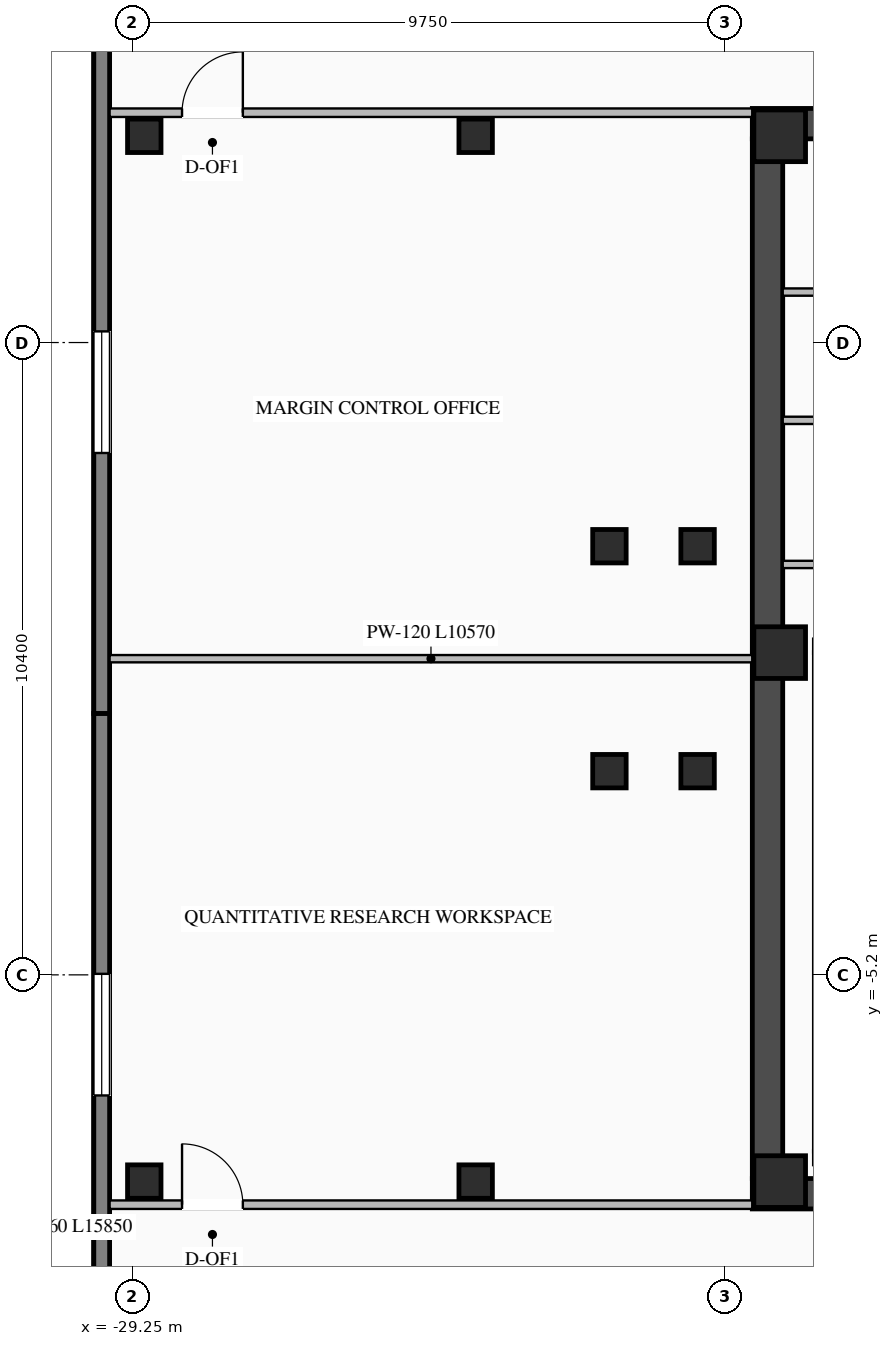
"""IFC4 building model, lengths in metres.
Left out: names, types, materials, properties, quantities, classifications, styles, units other than length and angle.
Written with IfcOpenShell. Run it as: python <this file> out.ifc"""

import sys

from ifc_helpers import new_model, si_unit, direction, frame, frame_2d, origin, origin_2d, place, context, subcontext, project, spatial, rectangle, i_section, extrude, element, fill, save


model = new_model("IFC4")
c1 = context("Model", 3, precision=1e-05, world=origin(), true_north=direction((0.0, 1.0)))
c2 = subcontext(c1, "Body", "Model", "MODEL_VIEW")
j1 = project(units=[si_unit("LENGTHUNIT", "METRE"), si_unit("PLANEANGLEUNIT", "RADIAN")], contexts=[c1])
p1 = place(None, origin())
s1 = spatial("IfcSite", under=j1, at=p1, CompositionType="ELEMENT")
p2 = place(p1, origin())
s2 = spatial("IfcBuilding", under=s1, at=p2, CompositionType="ELEMENT")
p3 = place(p2, frame((0.0, 0.0, 204.3)))
s3 = spatial("IfcBuildingStorey", under=s2, at=p3, CompositionType="ELEMENT", Elevation=204.3)
p4 = place(p3, frame((-19.05, -8.8, 0.0), z_axis=(0.0, 0.0, 1.0), x_axis=(1.0, 0.0, 0.0)))
e1 = element("IfcWall", 1, at=p4, inside=s3, PredefinedType="SHEAR", context=c2, shape_type="SweptSolid", body=[
    extrude(rectangle(XDim=10.25, YDim=0.5, at=frame_2d((5.125, 0.0))), origin(), (0.0, 0.0, 1.0), 4.02),
])
p5 = place(p3, frame((-19.05, 8.8, 0.0), z_axis=(0.0, 0.0, 1.0), x_axis=(1.0, 0.0, 0.0)))
e2 = element("IfcWall", 2, at=p5, inside=s3, PredefinedType="SHEAR", context=c2, shape_type="SweptSolid", body=[
    extrude(rectangle(XDim=10.25, YDim=0.5, at=frame_2d((5.125, 0.0))), origin(), (0.0, 0.0, 1.0), 4.02),
])
p6 = place(p5, frame((5.6, 0.0, 0.0)))
e3 = element("IfcOpeningElement", 3, at=p6, cuts=e2, PredefinedType="OPENING", context=c2, shape_type="SweptSolid", body=[
    extrude(rectangle(XDim=1.4, YDim=2.05, at=frame_2d((0.7, 1.025))), frame((0.0, 0.26, 0.0), z_axis=(0.0, -1.0, 0.0), x_axis=(1.0, 0.0, 0.0)), (0.0, 0.0, 1.0), 0.52),
])
p7 = place(p3, frame((-18.8, -8.55, 0.0), z_axis=(0.0, 0.0, 1.0), x_axis=(0.0, 1.0, 0.0)))
e4 = element("IfcWall", 4, at=p7, inside=s3, PredefinedType="SHEAR", context=c2, shape_type="SweptSolid", body=[
    extrude(rectangle(XDim=17.1, YDim=0.5, at=frame_2d((8.55, 0.0))), origin(), (0.0, 0.0, 1.0), 4.02),
])
for number, where, z_axis, x_axis in (
    (5, (-18.6, -8.6, 0.0), (0.0, 0.0, 1.0), (1.0, 0.0, 0.0)),
    (6, (-18.6, 0.1, 0.0), (0.0, 0.0, 1.0), (1.0, 0.0, 0.0)),
    (7, (-18.6, 8.6, 0.0), (0.0, 0.0, 1.0), (1.0, 0.0, 0.0)),
):
    element("IfcColumn", number, at=place(p3, frame(where, z_axis=z_axis, x_axis=x_axis)), inside=s3, PredefinedType="COLUMN", context=c2, shape_type="SweptSolid", body=[
        extrude(rectangle(XDim=0.85, YDim=0.85, at=origin_2d()), origin(), (0.0, 0.0, 1.0), 4.2),
    ])
for number, where, z_axis, x_axis in (
    (8, (-21.4, -1.85, 0.0), (0.0, 0.0, 1.0), (1.0, 0.0, 0.0)),
    (9, (-21.4, 1.85, 0.0), (0.0, 0.0, 1.0), (1.0, 0.0, 0.0)),
    (10, (-19.95, -1.85, 0.0), (0.0, 0.0, 1.0), (1.0, 0.0, 0.0)),
    (11, (-19.95, 1.85, 0.0), (0.0, 0.0, 1.0), (1.0, 0.0, 0.0)),
    (12, (-23.6, -8.6, 0.0), (0.0, 0.0, 1.0), (1.0, 0.0, 0.0)),
    (13, (-23.6, 8.6, 0.0), (0.0, 0.0, 1.0), (1.0, 0.0, 0.0)),
):
    element("IfcColumn", number, at=place(p3, frame(where, z_axis=z_axis, x_axis=x_axis)), inside=s3, PredefinedType="COLUMN", context=c2, shape_type="SweptSolid", body=[
        extrude(i_section(OverallWidth=0.55, OverallDepth=0.55, WebThickness=0.024, FlangeThickness=0.036, at=origin_2d()), origin(), (0.0, 0.0, 1.0), 4.2),
    ])
for number, where, z_axis, x_axis in (
    (14, (-29.05, -8.6, -0.28), (0.0, 0.0, 1.0), (1.0, 0.0, 0.0)),
    (15, (-29.05, 8.6, -0.28), (0.0, 0.0, 1.0), (1.0, 0.0, 0.0)),
):
    element("IfcColumn", number, at=place(p3, frame(where, z_axis=z_axis, x_axis=x_axis)), inside=s3, PredefinedType="COLUMN", context=c2, shape_type="SweptSolid", body=[
        extrude(i_section(OverallWidth=0.55, OverallDepth=0.55, WebThickness=0.024, FlangeThickness=0.036, at=origin_2d()), origin(), (0.0, 0.0, 1.0), 4.48),
    ])
p8 = place(p3, frame((-29.75, -16.75, 0.0), z_axis=(0.0, 0.0, 1.0), x_axis=(0.0, 1.0, 0.0)))
e16 = element("IfcWall", 16, at=p8, inside=s3, PredefinedType="STANDARD", context=c2, shape_type="SweptSolid", body=[
    extrude(rectangle(XDim=15.85, YDim=0.26, at=frame_2d((7.925, 0.0))), origin(), (0.0, 0.0, 1.0), 4.0),
])
p9 = place(p8, frame((3.233, 0.0, 0.76)))
e17 = element("IfcOpeningElement", 17, at=p9, cuts=e16, PredefinedType="OPENING", context=c2, shape_type="SweptSolid", body=[
    extrude(rectangle(XDim=2.0, YDim=2.05, at=frame_2d((1.0, 1.025))), frame((0.0, 0.14, 0.0), z_axis=(0.0, -1.0, 0.0), x_axis=(1.0, 0.0, 0.0)), (0.0, 0.0, 1.0), 0.28),
])
p10 = place(p8, frame((9.567, 0.0, 0.76)))
e18 = element("IfcOpeningElement", 18, at=p10, cuts=e16, PredefinedType="OPENING", context=c2, shape_type="SweptSolid", body=[
    extrude(rectangle(XDim=2.0, YDim=2.05, at=frame_2d((1.0, 1.025))), frame((0.0, 0.14, 0.0), z_axis=(0.0, -1.0, 0.0), x_axis=(1.0, 0.0, 0.0)), (0.0, 0.0, 1.0), 0.28),
])
p11 = place(p3, frame((-29.75, -0.9, 0.0), z_axis=(0.0, 0.0, 1.0), x_axis=(0.0, 1.0, 0.0)))
e19 = element("IfcWall", 19, at=p11, inside=s3, PredefinedType="STANDARD", context=c2, shape_type="SweptSolid", body=[
    extrude(rectangle(XDim=15.85, YDim=0.26, at=frame_2d((7.925, 0.0))), origin(), (0.0, 0.0, 1.0), 4.0),
])
p12 = place(p11, frame((4.283, 0.0, 0.76)))
e20 = element("IfcOpeningElement", 20, at=p12, cuts=e19, PredefinedType="OPENING", context=c2, shape_type="SweptSolid", body=[
    extrude(rectangle(XDim=2.0, YDim=2.05, at=frame_2d((1.0, 1.025))), frame((0.0, 0.14, 0.0), z_axis=(0.0, -1.0, 0.0), x_axis=(1.0, 0.0, 0.0)), (0.0, 0.0, 1.0), 0.28),
])
p13 = place(p3, frame((-18.55, 3.92, 0.0), z_axis=(0.0, 0.0, 1.0), x_axis=(1.0, 0.0, 0.0)))
e21 = element("IfcWall", 21, at=p13, inside=s3, PredefinedType="STANDARD", context=c2, shape_type="SweptSolid", body=[
    extrude(rectangle(XDim=4.65, YDim=0.12, at=frame_2d((2.325, 0.0))), origin(), (0.0, 0.0, 1.0), 4.0),
])
p14 = place(p3, frame((-18.55, 6.03, 0.0), z_axis=(0.0, 0.0, 1.0), x_axis=(1.0, 0.0, 0.0)))
e22 = element("IfcWall", 22, at=p14, inside=s3, PredefinedType="STANDARD", context=c2, shape_type="SweptSolid", body=[
    extrude(rectangle(XDim=2.4, YDim=0.12, at=frame_2d((1.2, 0.0))), origin(), (0.0, 0.0, 1.0), 4.0),
])
p15 = place(p3, frame((-18.55, 1.55, 0.0), z_axis=(0.0, 0.0, 1.0), x_axis=(1.0, 0.0, 0.0)))
e23 = element("IfcWall", 23, at=p15, inside=s3, PredefinedType="STANDARD", context=c2, shape_type="SweptSolid", body=[
    extrude(rectangle(XDim=4.65, YDim=0.12, at=frame_2d((2.325, 0.0))), origin(), (0.0, 0.0, 1.0), 4.0),
])
p16 = place(p3, frame((-29.62, 8.98, 0.0), z_axis=(0.0, 0.0, 1.0), x_axis=(1.0, 0.0, 0.0)))
e24 = element("IfcWall", 24, at=p16, inside=s3, PredefinedType="STANDARD", context=c2, shape_type="SweptSolid", body=[
    extrude(rectangle(XDim=10.57, YDim=0.14, at=frame_2d((5.285, 0.0))), origin(), (0.0, 0.0, 1.0), 4.0),
])
p17 = place(p16, frame((1.191, 0.0, 0.0)))
e25 = element("IfcOpeningElement", 25, at=p17, cuts=e24, PredefinedType="OPENING", context=c2, shape_type="SweptSolid", body=[
    extrude(rectangle(XDim=1.0, YDim=2.08, at=frame_2d((0.5, 1.04))), frame((0.0, 0.08, 0.0), z_axis=(0.0, -1.0, 0.0), x_axis=(1.0, 0.0, 0.0)), (0.0, 0.0, 1.0), 0.16),
])
p18 = place(p3, frame((-29.62, -8.98, 0.0), z_axis=(0.0, 0.0, 1.0), x_axis=(1.0, 0.0, 0.0)))
e26 = element("IfcWall", 26, at=p18, inside=s3, PredefinedType="STANDARD", context=c2, shape_type="SweptSolid", body=[
    extrude(rectangle(XDim=10.57, YDim=0.14, at=frame_2d((5.285, 0.0))), origin(), (0.0, 0.0, 1.0), 4.0),
])
p19 = place(p18, frame((1.191, 0.0, 0.0)))
e27 = element("IfcOpeningElement", 27, at=p19, cuts=e26, PredefinedType="OPENING", context=c2, shape_type="SweptSolid", body=[
    extrude(rectangle(XDim=1.0, YDim=2.08, at=frame_2d((0.5, 1.04))), frame((0.0, 0.08, 0.0), z_axis=(0.0, -1.0, 0.0), x_axis=(1.0, 0.0, 0.0)), (0.0, 0.0, 1.0), 0.16),
])
p20 = place(p3, frame((-29.62, 0.0, 0.0), z_axis=(0.0, 0.0, 1.0), x_axis=(1.0, 0.0, 0.0)))
e28 = element("IfcWall", 28, at=p20, inside=s3, PredefinedType="STANDARD", context=c2, shape_type="SweptSolid", body=[
    extrude(rectangle(XDim=10.57, YDim=0.12, at=frame_2d((5.285, 0.0))), origin(), (0.0, 0.0, 1.0), 3.595),
])
p21 = place(p10, origin())
e29 = element("IfcWindow", 29, at=p21, inside=s3, PartitioningType="DOUBLE_PANEL_VERTICAL", PredefinedType="WINDOW", context=c2, shape_type="SweptSolid", body=[
    extrude(rectangle(XDim=2.0, YDim=2.05, at=frame_2d((1.0, 1.025))), frame((0.0, 0.03, 0.0), z_axis=(0.0, -1.0, 0.0), x_axis=(1.0, 0.0, 0.0)), (0.0, 0.0, 1.0), 0.06),
])
fill(e18, e29)
p22 = place(p12, origin())
e30 = element("IfcWindow", 30, at=p22, inside=s3, PartitioningType="DOUBLE_PANEL_VERTICAL", PredefinedType="WINDOW", context=c2, shape_type="SweptSolid", body=[
    extrude(rectangle(XDim=2.0, YDim=2.05, at=frame_2d((1.0, 1.025))), frame((0.0, 0.03, 0.0), z_axis=(0.0, -1.0, 0.0), x_axis=(1.0, 0.0, 0.0)), (0.0, 0.0, 1.0), 0.06),
])
fill(e20, e30)
p23 = place(p17, origin())
e31 = element("IfcDoor", 31, at=p23, inside=s3, OperationType="SINGLE_SWING_RIGHT", PredefinedType="DOOR", context=c2, shape_type="SweptSolid", body=[
    extrude(rectangle(XDim=1.0, YDim=2.08, at=frame_2d((0.5, 1.04))), frame((0.0, 0.025, 0.0), z_axis=(0.0, -1.0, 0.0), x_axis=(1.0, 0.0, 0.0)), (0.0, 0.0, 1.0), 0.05),
])
fill(e25, e31)
p24 = place(p19, origin())
e32 = element("IfcDoor", 32, at=p24, inside=s3, OperationType="SINGLE_SWING_LEFT", PredefinedType="DOOR", context=c2, shape_type="SweptSolid", body=[
    extrude(rectangle(XDim=1.0, YDim=2.08, at=frame_2d((0.5, 1.04))), frame((0.0, 0.025, 0.0), z_axis=(0.0, -1.0, 0.0), x_axis=(1.0, 0.0, 0.0)), (0.0, 0.0, 1.0), 0.05),
])
fill(e27, e32)
save(model, sys.argv[1])
